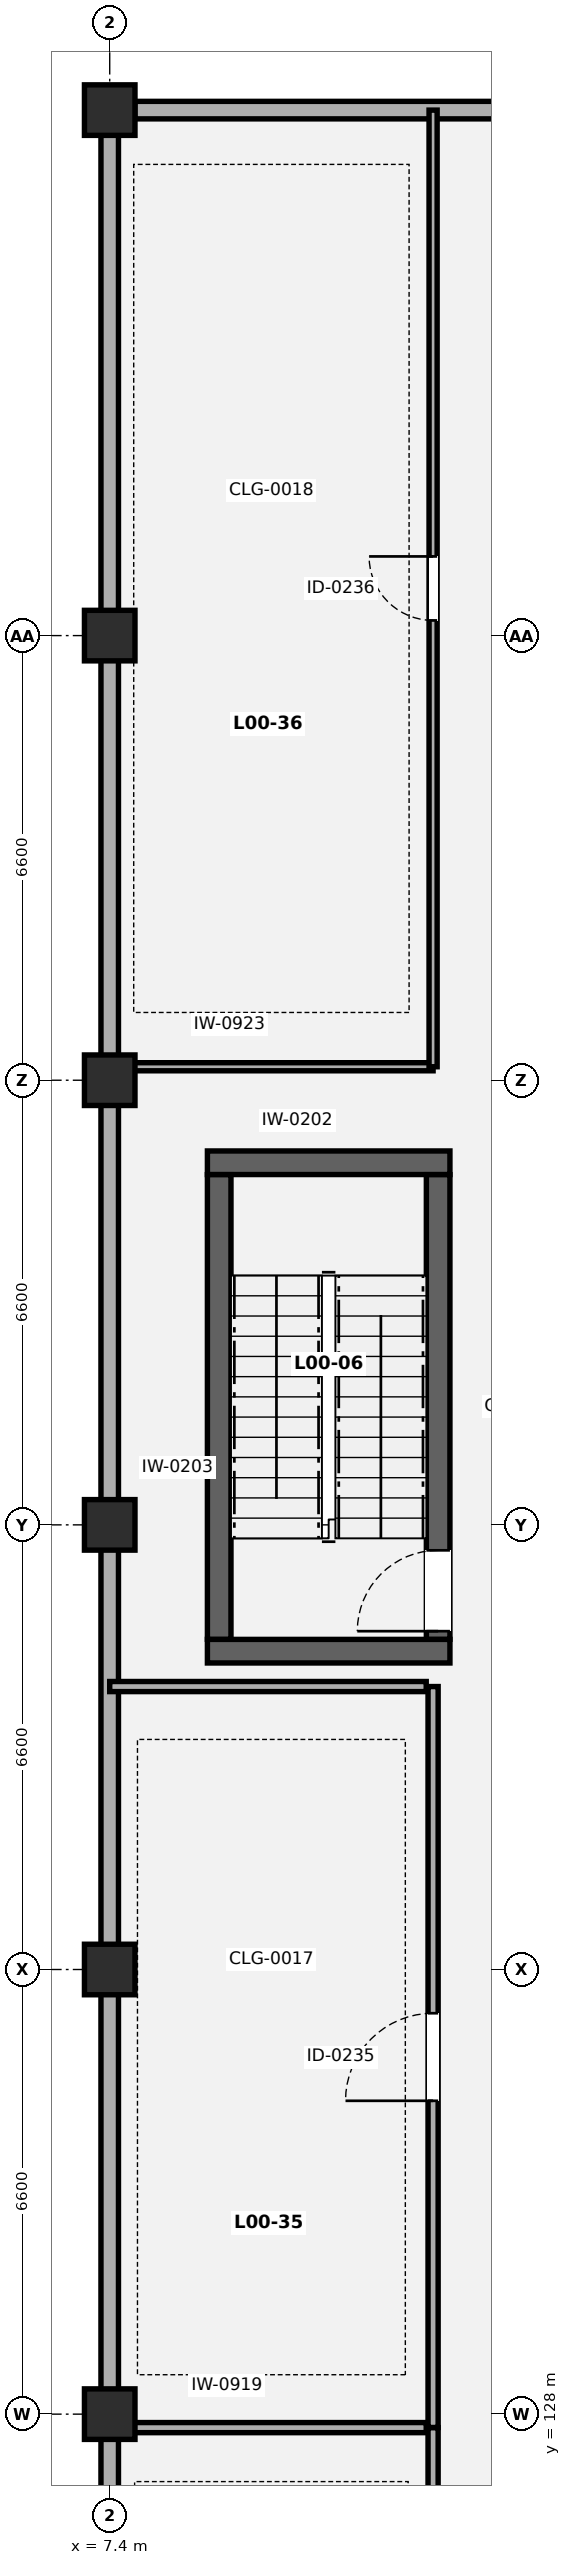
"""IFC4 building model, lengths in metres.
Left out: names, types, materials, properties, quantities, classifications, styles, units other than length and angle.
Written with IfcOpenShell. Run it as: python <this file> out.ifc"""

import sys

from ifc_helpers import new_model, si_unit, direction, frame, frame_2d, origin, origin_2d, place, context, subcontext, project, spatial, rectangle, extrude, element, fill, save


model = new_model("IFC4")
c1 = context("Model", 3, precision=1e-05, world=origin(), true_north=direction((0.0, 1.0)))
c2 = subcontext(c1, "Body", "Model", "MODEL_VIEW")
j1 = project(units=[si_unit("LENGTHUNIT", "METRE"), si_unit("PLANEANGLEUNIT", "RADIAN")], contexts=[c1])
p1 = place(None, origin())
s1 = spatial("IfcSite", under=j1, at=p1, CompositionType="ELEMENT")
p2 = place(p1, origin())
s2 = spatial("IfcBuilding", under=s1, at=p2, CompositionType="ELEMENT")
p3 = place(p2, origin())
s3 = spatial("IfcBuildingStorey", under=s2, at=p3, CompositionType="ELEMENT", Elevation=0.0)
for number, where, z_axis, x_axis in (
    (1, (7.4, 128.0, 0.0), (0.0, 0.0, 1.0), (1.0, 0.0, 0.0)),
    (2, (7.4, 134.6, 0.0), (0.0, 0.0, 1.0), (1.0, 0.0, 0.0)),
    (3, (7.4, 141.2, 0.0), (0.0, 0.0, 1.0), (1.0, 0.0, 0.0)),
    (4, (7.4, 147.8, 0.0), (0.0, 0.0, 1.0), (1.0, 0.0, 0.0)),
    (5, (7.4, 154.4, 0.0), (0.0, 0.0, 1.0), (1.0, 0.0, 0.0)),
    (6, (7.4, 162.2, 0.0), (0.0, 0.0, 1.0), (1.0, 0.0, 0.0)),
):
    element("IfcColumn", number, at=place(p3, frame(where, z_axis=z_axis, x_axis=x_axis)), inside=s3, PredefinedType="COLUMN", context=c2, shape_type="SweptSolid", body=[
        extrude(rectangle(XDim=0.75, YDim=0.75, at=origin_2d()), origin(), (0.0, 0.0, 1.0), 4.9),
    ])
p4 = place(p3, frame((7.4, 95.373, 0.0), z_axis=(0.0, 0.0, 1.0), x_axis=(0.0, 1.0, 0.0)))
e7 = element("IfcWall", 7, at=p4, inside=s3, PredefinedType="SOLIDWALL", context=c2, shape_type="SweptSolid", body=[
    extrude(rectangle(XDim=66.454, YDim=0.26, at=frame_2d((33.227, 0.0))), origin(), (0.0, 0.0, 1.0), 3.585),
])
p5 = place(p3, frame((7.773, 162.2, 0.0), z_axis=(0.0, 0.0, 1.0), x_axis=(1.0, 0.0, 0.0)))
e8 = element("IfcWall", 8, at=p5, inside=s3, PredefinedType="SOLIDWALL", context=c2, shape_type="SweptSolid", body=[
    extrude(rectangle(XDim=19.054, YDim=0.26, at=frame_2d((9.527, 0.0))), origin(), (0.0, 0.0, 1.0), 3.135),
])
p6 = place(p5, frame((7.077, 0.0, 0.0)))
e9 = element("IfcOpeningElement", 9, at=p6, cuts=e8, PredefinedType="OPENING", context=c2, shape_type="SweptSolid", body=[
    extrude(rectangle(XDim=1.25, YDim=2.15, at=frame_2d((0.625, 1.075))), frame((0.0, 0.14, 0.0), z_axis=(0.0, -1.0, 0.0), x_axis=(1.0, 0.0, 0.0)), (0.0, 0.0, 1.0), 0.28),
])
p7 = place(p5, frame((10.027, 0.0, 0.85)))
e10 = element("IfcOpeningElement", 10, at=p7, cuts=e8, PredefinedType="OPENING", context=c2, shape_type="SweptSolid", body=[
    extrude(rectangle(XDim=1.7, YDim=1.4, at=frame_2d((0.85, 0.7))), frame((0.0, 0.14, 0.0), z_axis=(0.0, -1.0, 0.0), x_axis=(1.0, 0.0, 0.0)), (0.0, 0.0, 1.0), 0.28),
])
for number, where, z_axis, x_axis in (
    (11, (8.85, 139.325, 0.0), (0.0, 0.0, 1.0), (1.0, 0.0, 0.0)),
    (12, (8.85, 146.575, 0.0), (0.0, 0.0, 1.0), (1.0, 0.0, 0.0)),
):
    element("IfcWall", number, at=place(p3, frame(where, z_axis=z_axis, x_axis=x_axis)), inside=s3, PredefinedType="SHEAR", context=c2, shape_type="SweptSolid", body=[
        extrude(rectangle(XDim=3.6, YDim=0.35, at=frame_2d((1.8, 0.0))), origin(), (0.0, 0.0, 1.0), 4.55),
    ])
p8 = place(p3, frame((9.025, 139.502, 0.0), z_axis=(0.0, 0.0, 1.0), x_axis=(0.0, 1.0, 0.0)))
e13 = element("IfcWall", 13, at=p8, inside=s3, PredefinedType="SHEAR", context=c2, shape_type="SweptSolid", body=[
    extrude(rectangle(XDim=6.896, YDim=0.35, at=frame_2d((3.448, 0.0))), origin(), (0.0, 0.0, 1.0), 4.55),
])
p9 = place(p3, frame((12.275, 139.502, 0.0), z_axis=(0.0, 0.0, 1.0), x_axis=(0.0, 1.0, 0.0)))
e14 = element("IfcWall", 14, at=p9, inside=s3, PredefinedType="SHEAR", context=c2, shape_type="SweptSolid", body=[
    extrude(rectangle(XDim=6.896, YDim=0.35, at=frame_2d((3.448, 0.0))), origin(), (0.0, 0.0, 1.0), 4.55),
])
p10 = place(p9, frame((0.12, 0.0, 0.0)))
e15 = element("IfcOpeningElement", 15, at=p10, cuts=e14, PredefinedType="OPENING", context=c2, shape_type="SweptSolid", body=[
    extrude(rectangle(XDim=1.2, YDim=2.15, at=frame_2d((0.6, 1.075))), frame((0.0, 0.185, 0.0), z_axis=(0.0, -1.0, 0.0), x_axis=(1.0, 0.0, 0.0)), (0.0, 0.0, 1.0), 0.37),
])
p11 = place(p3, frame((7.4, 127.8, 0.0), z_axis=(0.0, 0.0, 1.0), x_axis=(1.0, 0.0, 0.0)))
e16 = element("IfcWall", 16, at=p11, inside=s3, PredefinedType="PARTITIONING", context=c2, shape_type="SweptSolid", body=[
    extrude(rectangle(XDim=4.698, YDim=0.15, at=frame_2d((2.349, 0.0))), origin(), (0.0, 0.0, 1.0), 3.135),
])
p12 = place(p3, frame((12.2, 114.502, 0.0), z_axis=(0.0, 0.0, 1.0), x_axis=(0.0, 1.0, 0.0)))
e17 = element("IfcWall", 17, at=p12, inside=s3, PredefinedType="PARTITIONING", context=c2, shape_type="SweptSolid", body=[
    extrude(rectangle(XDim=13.298, YDim=0.15, at=frame_2d((6.649, 0.0))), origin(), (0.0, 0.0, 1.0), 4.55),
])
p13 = place(p12, frame((5.649, 0.0, 0.0)))
e18 = element("IfcOpeningElement", 18, at=p13, cuts=e17, PredefinedType="OPENING", context=c2, shape_type="SweptSolid", body=[
    extrude(rectangle(XDim=1.3, YDim=2.2, at=frame_2d((0.65, 1.1))), frame((0.0, 0.085, 0.0), z_axis=(0.0, -1.0, 0.0), x_axis=(1.0, 0.0, 0.0)), (0.0, 0.0, 1.0), 0.17),
])
p14 = place(p3, frame((7.4, 138.8, 0.0), z_axis=(0.0, 0.0, 1.0), x_axis=(1.0, 0.0, 0.0)))
e19 = element("IfcWall", 19, at=p14, inside=s3, PredefinedType="PARTITIONING", context=c2, shape_type="SweptSolid", body=[
    extrude(rectangle(XDim=4.698, YDim=0.15, at=frame_2d((2.349, 0.0))), origin(), (0.0, 0.0, 1.0), 4.55),
])
p15 = place(p3, frame((12.2, 127.802, 0.0), z_axis=(0.0, 0.0, 1.0), x_axis=(0.0, 1.0, 0.0)))
e20 = element("IfcWall", 20, at=p15, inside=s3, PredefinedType="PARTITIONING", context=c2, shape_type="SweptSolid", body=[
    extrude(rectangle(XDim=10.998, YDim=0.15, at=frame_2d((5.499, 0.0))), origin(), (0.0, 0.0, 1.0), 4.55),
])
p16 = place(p15, frame((4.849, 0.0, 0.0)))
e21 = element("IfcOpeningElement", 21, at=p16, cuts=e20, PredefinedType="OPENING", context=c2, shape_type="SweptSolid", body=[
    extrude(rectangle(XDim=1.3, YDim=2.2, at=frame_2d((0.65, 1.1))), frame((0.0, 0.085, 0.0), z_axis=(0.0, -1.0, 0.0), x_axis=(1.0, 0.0, 0.0)), (0.0, 0.0, 1.0), 0.17),
])
p17 = place(p3, frame((7.4, 148.0, 0.0), z_axis=(0.0, 0.0, 1.0), x_axis=(1.0, 0.0, 0.0)))
e22 = element("IfcWall", 22, at=p17, inside=s3, PredefinedType="PARTITIONING", context=c2, shape_type="SweptSolid", body=[
    extrude(rectangle(XDim=4.8, YDim=0.12, at=frame_2d((2.4, 0.0))), origin(), (0.0, 0.0, 1.0), 3.135),
])
p18 = place(p3, frame((12.2, 148.0, 0.0), z_axis=(0.0, 0.0, 1.0), x_axis=(0.0, 1.0, 0.0)))
e23 = element("IfcWall", 23, at=p18, inside=s3, PredefinedType="PARTITIONING", context=c2, shape_type="SweptSolid", body=[
    extrude(rectangle(XDim=14.2, YDim=0.12, at=frame_2d((7.1, 0.0))), origin(), (0.0, 0.0, 1.0), 4.55),
])
p19 = place(p18, frame((6.625, 0.0, 0.0)))
e24 = element("IfcOpeningElement", 24, at=p19, cuts=e23, PredefinedType="OPENING", context=c2, shape_type="SweptSolid", body=[
    extrude(rectangle(XDim=0.95, YDim=2.1, at=frame_2d((0.475, 1.05))), frame((0.0, 0.07, 0.0), z_axis=(0.0, -1.0, 0.0), x_axis=(1.0, 0.0, 0.0)), (0.0, 0.0, 1.0), 0.14),
])
p20 = place(p10, origin())
e25 = element("IfcDoor", 25, at=p20, inside=s3, OperationType="SINGLE_SWING_LEFT", PredefinedType="DOOR", context=c2, shape_type="SweptSolid", body=[
    extrude(rectangle(XDim=1.2, YDim=2.15, at=frame_2d((0.6, 1.075))), frame((0.0, 0.025, 0.0), z_axis=(0.0, -1.0, 0.0), x_axis=(1.0, 0.0, 0.0)), (0.0, 0.0, 1.0), 0.05),
])
fill(e15, e25)
p21 = place(p16, origin())
e26 = element("IfcDoor", 26, at=p21, inside=s3, OperationType="SINGLE_SWING_LEFT", PredefinedType="DOOR", context=c2, shape_type="SweptSolid", body=[
    extrude(rectangle(XDim=1.3, YDim=2.2, at=frame_2d((0.65, 1.1))), frame((0.0, 0.025, 0.0), z_axis=(0.0, -1.0, 0.0), x_axis=(1.0, 0.0, 0.0)), (0.0, 0.0, 1.0), 0.05),
])
fill(e21, e26)
p22 = place(p19, origin())
e27 = element("IfcDoor", 27, at=p22, inside=s3, OperationType="SINGLE_SWING_RIGHT", PredefinedType="DOOR", context=c2, shape_type="SweptSolid", body=[
    extrude(rectangle(XDim=0.95, YDim=2.1, at=frame_2d((0.475, 1.05))), frame((0.0, 0.025, 0.0), z_axis=(0.0, -1.0, 0.0), x_axis=(1.0, 0.0, 0.0)), (0.0, 0.0, 1.0), 0.05),
])
fill(e24, e27)
save(model, sys.argv[1])
